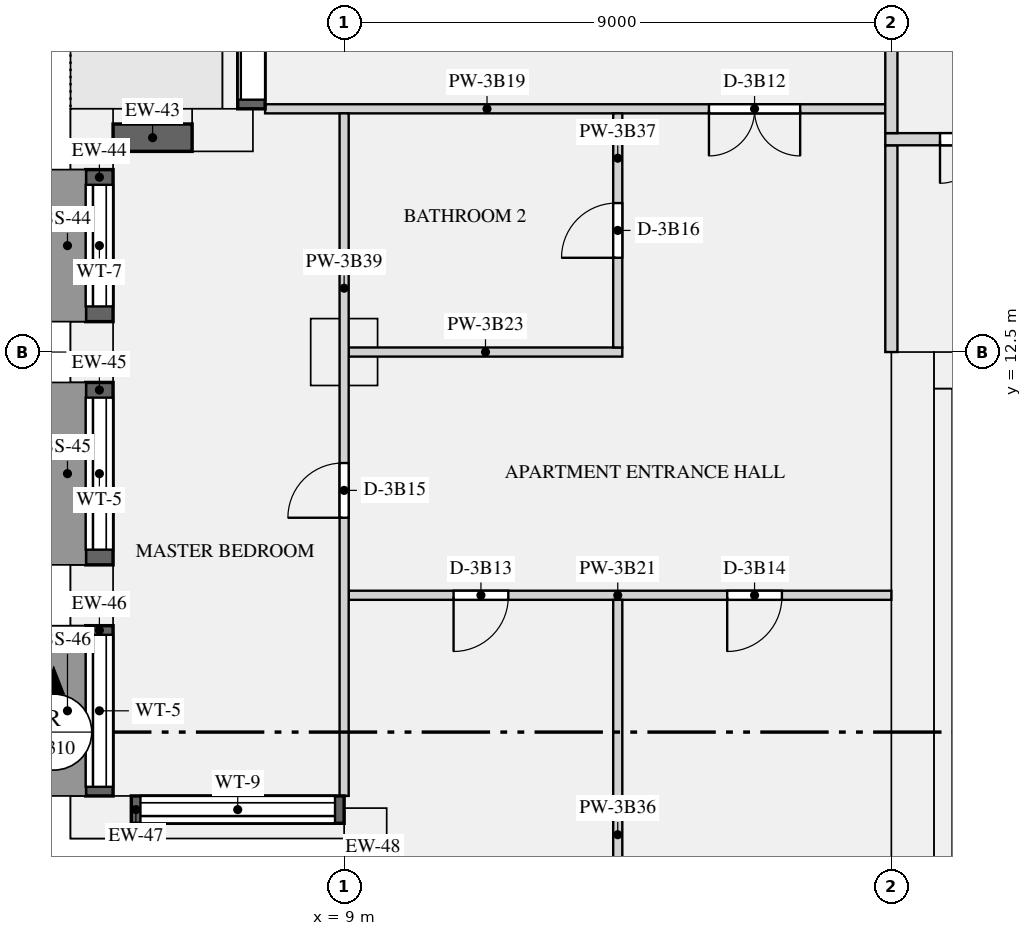
"""IFC4 building model, lengths in metres.
Left out: names, types, materials, properties, quantities, classifications, styles, units other than length and angle.
Written with IfcOpenShell. Run it as: python <this file> out.ifc"""

import sys

from ifc_helpers import new_model, si_unit, direction, frame, frame_2d, origin, origin_2d, place, context, subcontext, project, spatial, rectangle, extrude, element, fill, save


model = new_model("IFC4")
c1 = context("Model", 3, precision=1e-05, world=origin(), true_north=direction((0.0, 1.0)))
c2 = subcontext(c1, "Body", "Model", "MODEL_VIEW")
j1 = project(units=[si_unit("LENGTHUNIT", "METRE"), si_unit("PLANEANGLEUNIT", "RADIAN")], contexts=[c1])
p1 = place(None, origin())
s1 = spatial("IfcSite", under=j1, at=p1, CompositionType="ELEMENT")
p2 = place(p1, origin())
s2 = spatial("IfcBuilding", under=s1, at=p2, CompositionType="ELEMENT")
p3 = place(p2, frame((0.0, 0.0, 150.75)))
s3 = spatial("IfcBuildingStorey", under=s2, at=p3, CompositionType="ELEMENT", Elevation=150.75)
for number, where, z_axis, x_axis in (
    (1, (7.0, 16.15, 0.0), (0.0, 0.0, 1.0), (-1.0, 0.0, 0.0)),
    (2, (4.85, 16.0, 0.0), (0.0, 0.0, 1.0), (0.0, -1.0, 0.0)),
    (3, (4.85, 12.5, 0.0), (0.0, 0.0, 1.0), (0.0, -1.0, 0.0)),
    (4, (4.85, 8.5, 0.0), (0.0, 0.0, 1.0), (0.0, -1.0, 0.0)),
    (5, (5.0, 4.85, 0.0), (0.0, 0.0, 1.0), (1.0, 0.0, 0.0)),
    (6, (9.35, 4.5, 0.0), (0.0, 0.0, 1.0), (0.0, -1.0, 0.0)),
):
    element("IfcColumn", number, at=place(p3, frame(where, z_axis=z_axis, x_axis=x_axis)), inside=s3, PredefinedType="USERDEFINED", context=c2, shape_type="SweptSolid", body=[
        extrude(rectangle(XDim=1.0, YDim=0.7, at=origin_2d()), origin(), (0.0, 0.0, 1.0), 3.15),
    ])
p4 = place(p3, frame((9.0, 12.5, 0.0), z_axis=(0.0, 0.0, 1.0), x_axis=(1.0, 0.0, 0.0)))
e7 = element("IfcColumn", 7, at=p4, inside=s3, PredefinedType="COLUMN", context=c2, shape_type="SweptSolid", body=[
    extrude(rectangle(XDim=1.1, YDim=1.1, at=origin_2d()), origin(), (0.0, 0.0, 1.0), 3.15),
])
p5 = place(p3, frame((18.35, 0.0, 0.0), z_axis=(0.0, 0.0, 1.0), x_axis=(0.0, 1.0, 0.0)))
e8 = element("IfcWall", 8, at=p5, inside=s3, PredefinedType="SHEAR", context=c2, shape_type="SweptSolid", body=[
    extrude(rectangle(XDim=12.5, YDim=0.7, at=frame_2d((6.25, 0.0))), origin(), (0.0, 0.0, 1.0), 3.15),
])
p6 = place(p3, frame((18.7, 12.2, 0.0), z_axis=(0.0, 0.0, 1.0), x_axis=(1.0, 0.0, 0.0)))
e9 = element("IfcWall", 9, at=p6, inside=s3, PredefinedType="SHEAR", context=c2, shape_type="SweptSolid", body=[
    extrude(rectangle(XDim=34.6, YDim=0.6, at=frame_2d((17.3, 0.0))), origin(), (0.0, 0.0, 1.0), 3.15),
])
p7 = place(p6, frame((24.475, 0.0, 0.0)))
e10 = element("IfcOpeningElement", 10, at=p7, cuts=e9, PredefinedType="OPENING", context=c2, shape_type="SweptSolid", body=[
    extrude(rectangle(XDim=1.1, YDim=2.1, at=frame_2d((0.55, 1.05))), frame((0.0, 0.31, 0.0), z_axis=(0.0, -1.0, 0.0), x_axis=(1.0, 0.0, 0.0)), (0.0, 0.0, 1.0), 0.62),
])
p8 = place(p6, frame((26.725, 0.0, 0.0)))
e11 = element("IfcOpeningElement", 11, at=p8, cuts=e9, PredefinedType="OPENING", context=c2, shape_type="SweptSolid", body=[
    extrude(rectangle(XDim=1.1, YDim=2.1, at=frame_2d((0.55, 1.05))), frame((0.0, 0.31, 0.0), z_axis=(0.0, -1.0, 0.0), x_axis=(1.0, 0.0, 0.0)), (0.0, 0.0, 1.0), 0.62),
])
p9 = place(p6, frame((28.975, 0.0, 0.0)))
e12 = element("IfcOpeningElement", 12, at=p9, cuts=e9, PredefinedType="OPENING", context=c2, shape_type="SweptSolid", body=[
    extrude(rectangle(XDim=1.1, YDim=2.1, at=frame_2d((0.55, 1.05))), frame((0.0, 0.31, 0.0), z_axis=(0.0, -1.0, 0.0), x_axis=(1.0, 0.0, 0.0)), (0.0, 0.0, 1.0), 0.62),
])
p10 = place(p6, frame((4.85, 0.0, 0.0)))
e13 = element("IfcOpeningElement", 13, at=p10, cuts=e9, PredefinedType="OPENING", context=c2, shape_type="SweptSolid", body=[
    extrude(rectangle(XDim=0.9, YDim=2.1, at=frame_2d((0.45, 1.05))), frame((0.0, 0.31, 0.0), z_axis=(0.0, -1.0, 0.0), x_axis=(1.0, 0.0, 0.0)), (0.0, 0.0, 1.0), 0.62),
])
p11 = place(p6, frame((18.35, 0.0, 0.0)))
e14 = element("IfcOpeningElement", 14, at=p11, cuts=e9, PredefinedType="OPENING", context=c2, shape_type="SweptSolid", body=[
    extrude(rectangle(XDim=0.9, YDim=2.1, at=frame_2d((0.45, 1.05))), frame((0.0, 0.31, 0.0), z_axis=(0.0, -1.0, 0.0), x_axis=(1.0, 0.0, 0.0)), (0.0, 0.0, 1.0), 0.62),
])
p12 = place(p6, frame((1.45, 0.0, 0.0)))
e15 = element("IfcOpeningElement", 15, at=p12, cuts=e9, PredefinedType="OPENING", context=c2, shape_type="SweptSolid", body=[
    extrude(rectangle(XDim=1.2, YDim=2.1, at=frame_2d((0.6, 1.05))), frame((0.0, 0.31, 0.0), z_axis=(0.0, -1.0, 0.0), x_axis=(1.0, 0.0, 0.0)), (0.0, 0.0, 1.0), 0.62),
])
p13 = place(p6, frame((31.95, 0.0, 0.0)))
e16 = element("IfcOpeningElement", 16, at=p13, cuts=e9, PredefinedType="OPENING", context=c2, shape_type="SweptSolid", body=[
    extrude(rectangle(XDim=1.2, YDim=2.1, at=frame_2d((0.6, 1.05))), frame((0.0, 0.31, 0.0), z_axis=(0.0, -1.0, 0.0), x_axis=(1.0, 0.0, 0.0)), (0.0, 0.0, 1.0), 0.62),
])
p14 = place(p3, frame((18.85, 1.0, 0.0), z_axis=(0.0, 0.0, 1.0), x_axis=(0.0, 1.0, 0.0)))
e17 = element("IfcWall", 17, at=p14, inside=s3, PredefinedType="SHEAR", context=c2, shape_type="SweptSolid", body=[
    extrude(rectangle(XDim=10.9, YDim=0.3, at=frame_2d((5.45, 0.0))), origin(), (0.0, 0.0, 1.0), 3.15),
])
p15 = place(p3, frame((7.475, 20.0, 0.0), z_axis=(0.0, 0.0, 1.0), x_axis=(0.0, -1.0, 0.0)))
e18 = element("IfcWall", 18, at=p15, inside=s3, PredefinedType="SOLIDWALL", context=c2, shape_type="SweptSolid", body=[
    extrude(rectangle(XDim=3.5, YDim=0.45, at=frame_2d((1.75, 0.0))), origin(), (0.0, 0.0, 1.0), 2.83),
])
p16 = place(p15, frame((0.15, 0.0, 0.0)))
e19 = element("IfcOpeningElement", 19, at=p16, cuts=e18, PredefinedType="OPENING", context=c2, shape_type="SweptSolid", body=[
    extrude(rectangle(XDim=3.2, YDim=2.3, at=frame_2d((1.6, 1.15))), frame((0.0, 0.235, 0.0), z_axis=(0.0, -1.0, 0.0), x_axis=(1.0, 0.0, 0.0)), (0.0, 0.0, 1.0), 0.47),
])
p17 = place(p3, frame((6.5, 16.025, 0.9), z_axis=(0.0, 0.0, 1.0), x_axis=(-1.0, 0.0, 0.0)))
e20 = element("IfcWall", 20, at=p17, inside=s3, PredefinedType="SOLIDWALL", context=c2, shape_type="SweptSolid", body=[
    extrude(rectangle(XDim=1.3, YDim=0.45, at=frame_2d((0.65, 0.0))), origin(), (0.0, 0.0, 1.0), 1.93),
])
p18 = place(p3, frame((4.975, 15.5, 0.9), z_axis=(0.0, 0.0, 1.0), x_axis=(0.0, -1.0, 0.0)))
e21 = element("IfcWall", 21, at=p18, inside=s3, PredefinedType="SOLIDWALL", context=c2, shape_type="SweptSolid", body=[
    extrude(rectangle(XDim=2.5, YDim=0.45, at=frame_2d((1.25, 0.0))), origin(), (0.0, 0.0, 1.0), 1.93),
])
p19 = place(p18, frame((0.25, 0.0, 0.15)))
e22 = element("IfcOpeningElement", 22, at=p19, cuts=e21, PredefinedType="OPENING", context=c2, shape_type="SweptSolid", body=[
    extrude(rectangle(XDim=2.0, YDim=1.5, at=frame_2d((1.0, 0.75))), frame((0.0, 0.235, 0.0), z_axis=(0.0, -1.0, 0.0), x_axis=(1.0, 0.0, 0.0)), (0.0, 0.0, 1.0), 0.47),
])
p20 = place(p3, frame((4.975, 12.0, 0.9), z_axis=(0.0, 0.0, 1.0), x_axis=(0.0, -1.0, 0.0)))
e23 = element("IfcWall", 23, at=p20, inside=s3, PredefinedType="SOLIDWALL", context=c2, shape_type="SweptSolid", body=[
    extrude(rectangle(XDim=3.0, YDim=0.45, at=frame_2d((1.5, 0.0))), origin(), (0.0, 0.0, 1.0), 1.93),
])
p21 = place(p20, frame((0.25, 0.0, 0.15)))
e24 = element("IfcOpeningElement", 24, at=p21, cuts=e23, PredefinedType="OPENING", context=c2, shape_type="SweptSolid", body=[
    extrude(rectangle(XDim=2.5, YDim=1.5, at=frame_2d((1.25, 0.75))), frame((0.0, 0.235, 0.0), z_axis=(0.0, -1.0, 0.0), x_axis=(1.0, 0.0, 0.0)), (0.0, 0.0, 1.0), 0.47),
])
p22 = place(p3, frame((4.975, 8.0, 0.9), z_axis=(0.0, 0.0, 1.0), x_axis=(0.0, -1.0, 0.0)))
e25 = element("IfcWall", 25, at=p22, inside=s3, PredefinedType="SOLIDWALL", context=c2, shape_type="SweptSolid", body=[
    extrude(rectangle(XDim=2.8, YDim=0.45, at=frame_2d((1.4, 0.0))), origin(), (0.0, 0.0, 1.0), 1.93),
])
p23 = place(p22, frame((0.15, 0.0, 0.15)))
e26 = element("IfcOpeningElement", 26, at=p23, cuts=e25, PredefinedType="OPENING", context=c2, shape_type="SweptSolid", body=[
    extrude(rectangle(XDim=2.5, YDim=1.5, at=frame_2d((1.25, 0.75))), frame((0.0, 0.235, 0.0), z_axis=(0.0, -1.0, 0.0), x_axis=(1.0, 0.0, 0.0)), (0.0, 0.0, 1.0), 0.47),
])
p24 = place(p3, frame((5.5, 4.975, 0.9), z_axis=(0.0, 0.0, 1.0), x_axis=(1.0, 0.0, 0.0)))
e27 = element("IfcWall", 27, at=p24, inside=s3, PredefinedType="SOLIDWALL", context=c2, shape_type="SweptSolid", body=[
    extrude(rectangle(XDim=3.5, YDim=0.45, at=frame_2d((1.75, 0.0))), origin(), (0.0, 0.0, 1.0), 1.93),
])
p25 = place(p24, frame((0.15, 0.0, 0.15)))
e28 = element("IfcOpeningElement", 28, at=p25, cuts=e27, PredefinedType="OPENING", context=c2, shape_type="SweptSolid", body=[
    extrude(rectangle(XDim=3.2, YDim=1.5, at=frame_2d((1.6, 0.75))), frame((0.0, 0.235, 0.0), z_axis=(0.0, -1.0, 0.0), x_axis=(1.0, 0.0, 0.0)), (0.0, 0.0, 1.0), 0.47),
])
p26 = place(p3, frame((18.0, 12.5, 0.0), z_axis=(0.0, 0.0, 1.0), x_axis=(0.0, 1.0, 0.0)))
e29 = element("IfcWall", 29, at=p26, inside=s3, PredefinedType="PARTITIONING", context=c2, shape_type="SweptSolid", body=[
    extrude(rectangle(XDim=3.4, YDim=0.2, at=frame_2d((1.7, 0.0))), origin(), (0.0, 0.0, 1.0), 2.83),
])
p27 = place(p3, frame((7.7, 16.5, 0.0), z_axis=(0.0, 0.0, 1.0), x_axis=(1.0, 0.0, 0.0)))
e30 = element("IfcWall", 30, at=p27, inside=s3, PredefinedType="PARTITIONING", context=c2, shape_type="SweptSolid", body=[
    extrude(rectangle(XDim=10.2, YDim=0.15, at=frame_2d((5.1, 0.0))), origin(), (0.0, 0.0, 1.0), 2.83),
])
p28 = place(p27, frame((7.3, 0.0, 0.0)))
e31 = element("IfcOpeningElement", 31, at=p28, cuts=e30, PredefinedType="OPENING", context=c2, shape_type="SweptSolid", body=[
    extrude(rectangle(XDim=1.5, YDim=2.1, at=frame_2d((0.75, 1.05))), frame((0.0, 0.085, 0.0), z_axis=(0.0, -1.0, 0.0), x_axis=(1.0, 0.0, 0.0)), (0.0, 0.0, 1.0), 0.17),
])
p29 = place(p3, frame((9.075, 8.5, 0.0), z_axis=(0.0, 0.0, 1.0), x_axis=(1.0, 0.0, 0.0)))
e32 = element("IfcWall", 32, at=p29, inside=s3, PredefinedType="PARTITIONING", context=c2, shape_type="SweptSolid", body=[
    extrude(rectangle(XDim=8.925, YDim=0.15, at=frame_2d((4.462, 0.0))), origin(), (0.0, 0.0, 1.0), 2.83),
])
p30 = place(p29, frame((1.725, 0.0, 0.0)))
e33 = element("IfcOpeningElement", 33, at=p30, cuts=e32, PredefinedType="OPENING", context=c2, shape_type="SweptSolid", body=[
    extrude(rectangle(XDim=0.9, YDim=2.1, at=frame_2d((0.45, 1.05))), frame((0.0, 0.085, 0.0), z_axis=(0.0, -1.0, 0.0), x_axis=(1.0, 0.0, 0.0)), (0.0, 0.0, 1.0), 0.17),
])
p31 = place(p29, frame((6.225, 0.0, 0.0)))
e34 = element("IfcOpeningElement", 34, at=p31, cuts=e32, PredefinedType="OPENING", context=c2, shape_type="SweptSolid", body=[
    extrude(rectangle(XDim=0.9, YDim=2.1, at=frame_2d((0.45, 1.05))), frame((0.0, 0.085, 0.0), z_axis=(0.0, -1.0, 0.0), x_axis=(1.0, 0.0, 0.0)), (0.0, 0.0, 1.0), 0.17),
])
p32 = place(p3, frame((9.075, 12.5, 0.0), z_axis=(0.0, 0.0, 1.0), x_axis=(1.0, 0.0, 0.0)))
e35 = element("IfcWall", 35, at=p32, inside=s3, PredefinedType="PARTITIONING", context=c2, shape_type="SweptSolid", body=[
    extrude(rectangle(XDim=4.5, YDim=0.15, at=frame_2d((2.25, 0.0))), origin(), (0.0, 0.0, 1.0), 2.83),
])
p33 = place(p3, frame((17.9, 16.0, 0.0), z_axis=(0.0, 0.0, 1.0), x_axis=(1.0, 0.0, 0.0)))
e36 = element("IfcWall", 36, at=p33, inside=s3, PredefinedType="PARTITIONING", context=c2, shape_type="SweptSolid", body=[
    extrude(rectangle(XDim=36.2, YDim=0.2, at=frame_2d((18.1, 0.0))), origin(), (0.0, 0.0, 1.0), 2.83),
])
p34 = place(p33, frame((0.9, 0.0, 0.0)))
e37 = element("IfcOpeningElement", 37, at=p34, cuts=e36, PredefinedType="OPENING", context=c2, shape_type="SweptSolid", body=[
    extrude(rectangle(XDim=1.4, YDim=2.1, at=frame_2d((0.7, 1.05))), frame((0.0, 0.11, 0.0), z_axis=(0.0, -1.0, 0.0), x_axis=(1.0, 0.0, 0.0)), (0.0, 0.0, 1.0), 0.22),
])
p35 = place(p33, frame((33.9, 0.0, 0.0)))
e38 = element("IfcOpeningElement", 38, at=p35, cuts=e36, PredefinedType="OPENING", context=c2, shape_type="SweptSolid", body=[
    extrude(rectangle(XDim=1.4, YDim=2.1, at=frame_2d((0.7, 1.05))), frame((0.0, 0.11, 0.0), z_axis=(0.0, -1.0, 0.0), x_axis=(1.0, 0.0, 0.0)), (0.0, 0.0, 1.0), 0.22),
])
p36 = place(p3, frame((18.0, 16.1, 0.0), z_axis=(0.0, 0.0, 1.0), x_axis=(0.0, 1.0, 0.0)))
e39 = element("IfcWall", 39, at=p36, inside=s3, PredefinedType="PARTITIONING", context=c2, shape_type="SweptSolid", body=[
    extrude(rectangle(XDim=7.8, YDim=0.2, at=frame_2d((3.9, 0.0))), origin(), (0.0, 0.0, 1.0), 2.83),
])
p37 = place(p3, frame((13.5, 0.7, 0.0), z_axis=(0.0, 0.0, 1.0), x_axis=(0.0, 1.0, 0.0)))
e40 = element("IfcWall", 40, at=p37, inside=s3, PredefinedType="PARTITIONING", context=c2, shape_type="SweptSolid", body=[
    extrude(rectangle(XDim=7.725, YDim=0.15, at=frame_2d((3.863, 0.0))), origin(), (0.0, 0.0, 1.0), 2.83),
])
p38 = place(p3, frame((13.5, 12.575, 0.0), z_axis=(0.0, 0.0, 1.0), x_axis=(0.0, 1.0, 0.0)))
e41 = element("IfcWall", 41, at=p38, inside=s3, PredefinedType="PARTITIONING", context=c2, shape_type="SweptSolid", body=[
    extrude(rectangle(XDim=3.85, YDim=0.15, at=frame_2d((1.925, 0.0))), origin(), (0.0, 0.0, 1.0), 2.83),
])
p39 = place(p38, frame((1.475, 0.0, 0.0)))
e42 = element("IfcOpeningElement", 42, at=p39, cuts=e41, PredefinedType="OPENING", context=c2, shape_type="SweptSolid", body=[
    extrude(rectangle(XDim=0.9, YDim=2.1, at=frame_2d((0.45, 1.05))), frame((0.0, 0.085, 0.0), z_axis=(0.0, -1.0, 0.0), x_axis=(1.0, 0.0, 0.0)), (0.0, 0.0, 1.0), 0.17),
])
p40 = place(p3, frame((9.0, 5.2, 0.0), z_axis=(0.0, 0.0, 1.0), x_axis=(0.0, 1.0, 0.0)))
e43 = element("IfcWall", 43, at=p40, inside=s3, PredefinedType="PARTITIONING", context=c2, shape_type="SweptSolid", body=[
    extrude(rectangle(XDim=11.225, YDim=0.15, at=frame_2d((5.613, 0.0))), origin(), (0.0, 0.0, 1.0), 2.83),
])
p41 = place(p40, frame((4.575, 0.0, 0.0)))
e44 = element("IfcOpeningElement", 44, at=p41, cuts=e43, PredefinedType="OPENING", context=c2, shape_type="SweptSolid", body=[
    extrude(rectangle(XDim=0.9, YDim=2.1, at=frame_2d((0.45, 1.05))), frame((0.0, 0.085, 0.0), z_axis=(0.0, -1.0, 0.0), x_axis=(1.0, 0.0, 0.0)), (0.0, 0.0, 1.0), 0.17),
])
p42 = place(p16, origin())
e45 = element("IfcDoor", 45, at=p42, inside=s3, OperationType="SLIDING_TO_LEFT", PredefinedType="DOOR", context=c2, shape_type="SweptSolid", body=[
    extrude(rectangle(XDim=3.2, YDim=2.3, at=frame_2d((1.6, 1.15))), frame((0.0, -0.07, 0.0), z_axis=(0.0, -1.0, 0.0), x_axis=(1.0, 0.0, 0.0)), (0.0, 0.0, 1.0), 0.05),
])
fill(e19, e45)
p43 = place(p19, origin())
e46 = element("IfcWindow", 46, at=p43, inside=s3, PartitioningType="SINGLE_PANEL", PredefinedType="WINDOW", context=c2, shape_type="SweptSolid", body=[
    extrude(rectangle(XDim=2.0, YDim=1.5, at=frame_2d((1.0, 0.75))), frame((0.0, -0.065, 0.0), z_axis=(0.0, -1.0, 0.0), x_axis=(1.0, 0.0, 0.0)), (0.0, 0.0, 1.0), 0.06),
])
fill(e22, e46)
p44 = place(p21, origin())
e47 = element("IfcWindow", 47, at=p44, inside=s3, PartitioningType="SINGLE_PANEL", PredefinedType="WINDOW", context=c2, shape_type="SweptSolid", body=[
    extrude(rectangle(XDim=2.5, YDim=1.5, at=frame_2d((1.25, 0.75))), frame((0.0, -0.065, 0.0), z_axis=(0.0, -1.0, 0.0), x_axis=(1.0, 0.0, 0.0)), (0.0, 0.0, 1.0), 0.06),
])
fill(e24, e47)
p45 = place(p23, origin())
e48 = element("IfcWindow", 48, at=p45, inside=s3, PartitioningType="SINGLE_PANEL", PredefinedType="WINDOW", context=c2, shape_type="SweptSolid", body=[
    extrude(rectangle(XDim=2.5, YDim=1.5, at=frame_2d((1.25, 0.75))), frame((0.0, -0.065, 0.0), z_axis=(0.0, -1.0, 0.0), x_axis=(1.0, 0.0, 0.0)), (0.0, 0.0, 1.0), 0.06),
])
fill(e26, e48)
p46 = place(p25, origin())
e49 = element("IfcWindow", 49, at=p46, inside=s3, PartitioningType="SINGLE_PANEL", PredefinedType="WINDOW", context=c2, shape_type="SweptSolid", body=[
    extrude(rectangle(XDim=3.2, YDim=1.5, at=frame_2d((1.6, 0.75))), frame((0.0, -0.065, 0.0), z_axis=(0.0, -1.0, 0.0), x_axis=(1.0, 0.0, 0.0)), (0.0, 0.0, 1.0), 0.06),
])
fill(e28, e49)
p47 = place(p34, frame((1.4, 0.0, 0.0), z_axis=(0.0, 0.0, 1.0), x_axis=(-1.0, 0.0, 0.0)))
e50 = element("IfcDoor", 50, at=p47, inside=s3, OperationType="DOUBLE_DOOR_SINGLE_SWING", PredefinedType="DOOR", context=c2, shape_type="SweptSolid", body=[
    extrude(rectangle(XDim=1.4, YDim=2.1, at=frame_2d((0.7, 1.05))), frame((0.0, 0.025, 0.0), z_axis=(0.0, -1.0, 0.0), x_axis=(1.0, 0.0, 0.0)), (0.0, 0.0, 1.0), 0.05),
])
fill(e37, e50)
p48 = place(p28, frame((1.5, 0.0, 0.0), z_axis=(0.0, 0.0, 1.0), x_axis=(-1.0, 0.0, 0.0)))
e51 = element("IfcDoor", 51, at=p48, inside=s3, OperationType="DOUBLE_DOOR_SINGLE_SWING", PredefinedType="DOOR", context=c2, shape_type="SweptSolid", body=[
    extrude(rectangle(XDim=1.5, YDim=2.1, at=frame_2d((0.75, 1.05))), frame((0.0, 0.025, 0.0), z_axis=(0.0, -1.0, 0.0), x_axis=(1.0, 0.0, 0.0)), (0.0, 0.0, 1.0), 0.05),
])
fill(e31, e51)
p49 = place(p30, frame((0.9, 0.0, 0.0), z_axis=(0.0, 0.0, 1.0), x_axis=(-1.0, 0.0, 0.0)))
e52 = element("IfcDoor", 52, at=p49, inside=s3, OperationType="SINGLE_SWING_RIGHT", PredefinedType="DOOR", context=c2, shape_type="SweptSolid", body=[
    extrude(rectangle(XDim=0.9, YDim=2.1, at=frame_2d((0.45, 1.05))), frame((0.0, 0.025, 0.0), z_axis=(0.0, -1.0, 0.0), x_axis=(1.0, 0.0, 0.0)), (0.0, 0.0, 1.0), 0.05),
])
fill(e33, e52)
p50 = place(p31, frame((0.9, 0.0, 0.0), z_axis=(0.0, 0.0, 1.0), x_axis=(-1.0, 0.0, 0.0)))
e53 = element("IfcDoor", 53, at=p50, inside=s3, OperationType="SINGLE_SWING_RIGHT", PredefinedType="DOOR", context=c2, shape_type="SweptSolid", body=[
    extrude(rectangle(XDim=0.9, YDim=2.1, at=frame_2d((0.45, 1.05))), frame((0.0, 0.025, 0.0), z_axis=(0.0, -1.0, 0.0), x_axis=(1.0, 0.0, 0.0)), (0.0, 0.0, 1.0), 0.05),
])
fill(e34, e53)
p51 = place(p41, origin())
e54 = element("IfcDoor", 54, at=p51, inside=s3, OperationType="SINGLE_SWING_LEFT", PredefinedType="DOOR", context=c2, shape_type="SweptSolid", body=[
    extrude(rectangle(XDim=0.9, YDim=2.1, at=frame_2d((0.45, 1.05))), frame((0.0, 0.025, 0.0), z_axis=(0.0, -1.0, 0.0), x_axis=(1.0, 0.0, 0.0)), (0.0, 0.0, 1.0), 0.05),
])
fill(e44, e54)
p52 = place(p39, origin())
e55 = element("IfcDoor", 55, at=p52, inside=s3, OperationType="SINGLE_SWING_LEFT", PredefinedType="DOOR", context=c2, shape_type="SweptSolid", body=[
    extrude(rectangle(XDim=0.9, YDim=2.1, at=frame_2d((0.45, 1.05))), frame((0.0, 0.025, 0.0), z_axis=(0.0, -1.0, 0.0), x_axis=(1.0, 0.0, 0.0)), (0.0, 0.0, 1.0), 0.05),
])
fill(e42, e55)
save(model, sys.argv[1])
